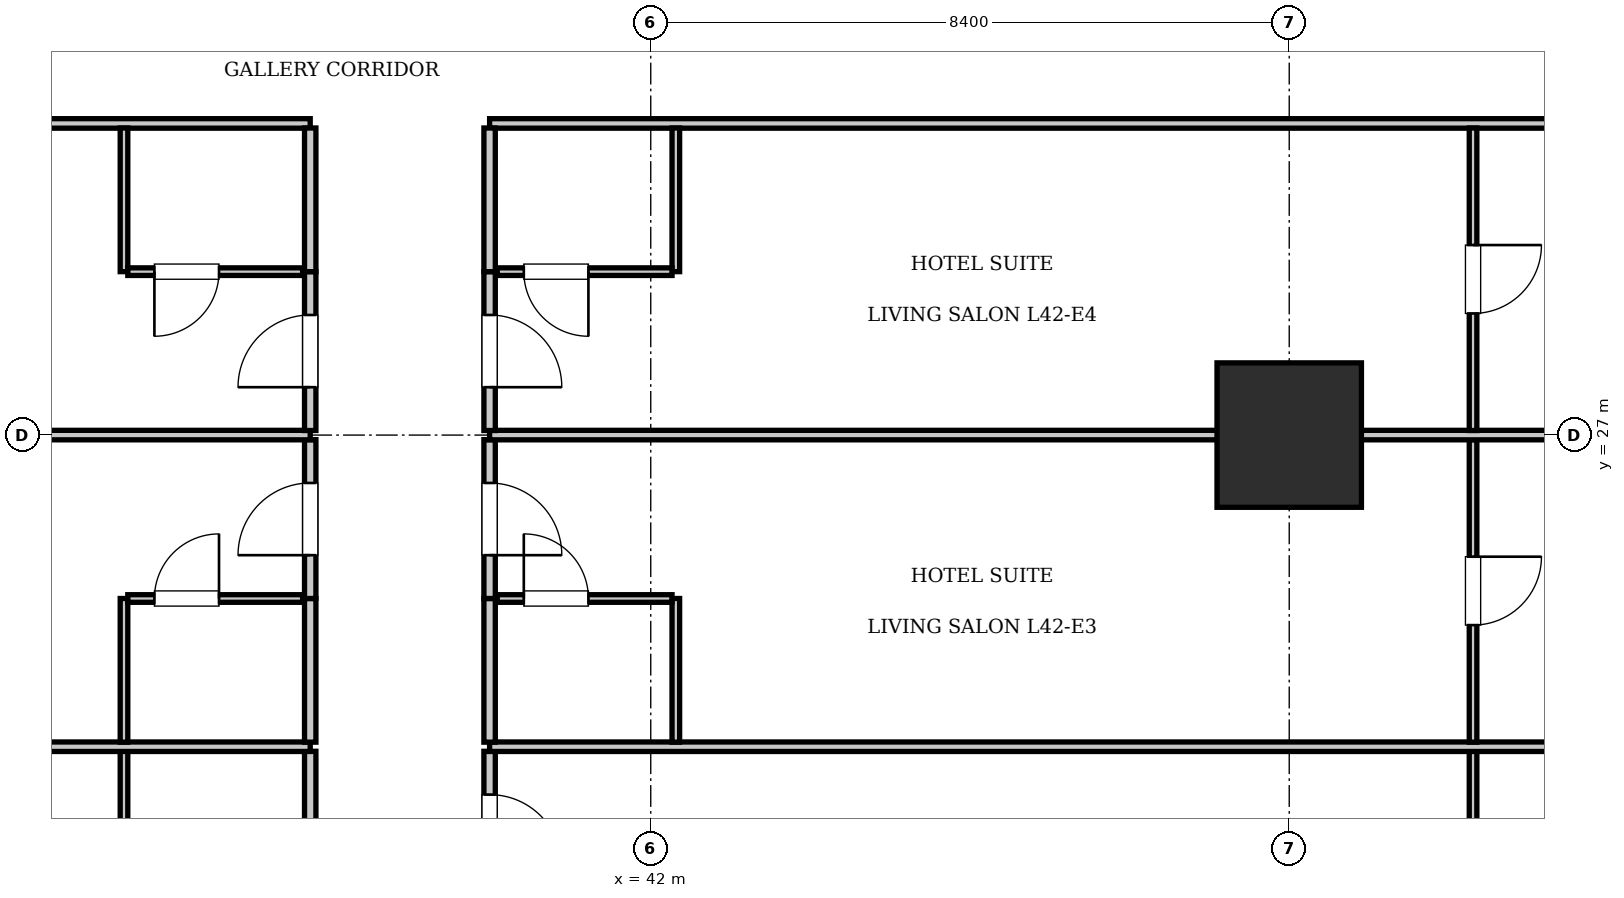
"""IFC4 building model, lengths in metres.
Left out: names, types, materials, properties, quantities, classifications, styles, units other than length and angle.
Written with IfcOpenShell. Run it as: python <this file> out.ifc"""

import sys

from ifc_helpers import new_model, si_unit, direction, frame, frame_2d, origin, origin_2d, place, context, subcontext, project, spatial, rectangle, extrude, element, fill, save


model = new_model("IFC4")
c1 = context("Model", 3, precision=1e-05, world=origin(), true_north=direction((0.0, 1.0)))
c2 = subcontext(c1, "Body", "Model", "MODEL_VIEW")
j1 = project(units=[si_unit("LENGTHUNIT", "METRE"), si_unit("PLANEANGLEUNIT", "RADIAN")], contexts=[c1])
p1 = place(None, origin())
s1 = spatial("IfcSite", under=j1, at=p1, CompositionType="ELEMENT")
p2 = place(p1, origin())
s2 = spatial("IfcBuilding", under=s1, at=p2, CompositionType="ELEMENT")
p3 = place(p2, frame((0.0, 0.0, 173.6)))
s3 = spatial("IfcBuildingStorey", under=s2, at=p3, CompositionType="ELEMENT", Elevation=173.6)
p4 = place(p3, frame((50.4, 27.0, 0.0), z_axis=(0.0, 0.0, 1.0), x_axis=(1.0, 0.0, 0.0)))
e1 = element("IfcColumn", 1, at=p4, inside=s3, PredefinedType="COLUMN", context=c2, shape_type="SweptSolid", body=[
    extrude(rectangle(XDim=1.9, YDim=1.9, at=origin_2d()), origin(), (0.0, 0.0, 1.0), 3.85),
])
p5 = place(p3, frame((13.2, 31.1, 0.0), z_axis=(0.0, 0.0, 1.0), x_axis=(1.0, 0.0, 0.0)))
e2 = element("IfcWall", 2, at=p5, inside=s3, PredefinedType="PARTITIONING", context=c2, shape_type="SweptSolid", body=[
    extrude(rectangle(XDim=24.32, YDim=0.125, at=frame_2d((12.16, 0.0))), origin(), (0.0, 0.0, 1.0), 3.61),
])
p6 = place(p3, frame((39.88, 31.1, 0.0), z_axis=(0.0, 0.0, 1.0), x_axis=(1.0, 0.0, 0.0)))
e3 = element("IfcWall", 3, at=p6, inside=s3, PredefinedType="PARTITIONING", context=c2, shape_type="SweptSolid", body=[
    extrude(rectangle(XDim=22.52, YDim=0.125, at=frame_2d((11.26, 0.0))), origin(), (0.0, 0.0, 1.0), 3.61),
])
p7 = place(p3, frame((37.52, 20.95, 0.0), z_axis=(0.0, 0.0, 1.0), x_axis=(0.0, 1.0, 0.0)))
e4 = element("IfcWall", 4, at=p7, inside=s3, PredefinedType="PARTITIONING", context=c2, shape_type="SweptSolid", body=[
    extrude(rectangle(XDim=1.89, YDim=0.15, at=frame_2d((0.945, 0.0))), origin(), (0.0, 0.0, 1.0), 3.61),
])
p8 = place(p3, frame((35.07, 20.95, 0.0), z_axis=(0.0, 0.0, 1.0), x_axis=(0.0, 1.0, 0.0)))
e5 = element("IfcWall", 5, at=p8, inside=s3, PredefinedType="PARTITIONING", context=c2, shape_type="SweptSolid", body=[
    extrude(rectangle(XDim=1.89, YDim=0.1, at=frame_2d((0.945, 0.0))), origin(), (0.0, 0.0, 1.0), 3.61),
])
p9 = place(p3, frame((39.88, 20.75, 0.0), z_axis=(0.0, 0.0, 1.0), x_axis=(0.0, 1.0, 0.0)))
e6 = element("IfcWall", 6, at=p9, inside=s3, PredefinedType="PARTITIONING", context=c2, shape_type="SweptSolid", body=[
    extrude(rectangle(XDim=2.09, YDim=0.15, at=frame_2d((1.045, 0.0))), origin(), (0.0, 0.0, 1.0), 3.61),
])
p10 = place(p9, frame((0.57, 0.0, 0.0)))
e7 = element("IfcOpeningElement", 7, at=p10, cuts=e6, PredefinedType="OPENING", context=c2, shape_type="SweptSolid", body=[
    extrude(rectangle(XDim=0.95, YDim=2.15, at=frame_2d((0.475, 1.075))), frame((0.0, 0.085, 0.0), z_axis=(0.0, -1.0, 0.0), x_axis=(1.0, 0.0, 0.0)), (0.0, 0.0, 1.0), 0.17),
])
p11 = place(p3, frame((52.818, 18.86, 0.0), z_axis=(0.0, 0.0, 1.0), x_axis=(0.0, 1.0, 0.0)))
e8 = element("IfcWall", 8, at=p11, inside=s3, PredefinedType="PARTITIONING", context=c2, shape_type="SweptSolid", body=[
    extrude(rectangle(XDim=3.98, YDim=0.1, at=frame_2d((1.99, 0.0))), origin(), (0.0, 0.0, 1.0), 3.61),
])
p12 = place(p11, frame((1.54, 0.0, 0.0)))
e9 = element("IfcOpeningElement", 9, at=p12, cuts=e8, PredefinedType="OPENING", context=c2, shape_type="SweptSolid", body=[
    extrude(rectangle(XDim=0.9, YDim=2.1, at=frame_2d((0.45, 1.05))), frame((0.0, 0.06, 0.0), z_axis=(0.0, -1.0, 0.0), x_axis=(1.0, 0.0, 0.0)), (0.0, 0.0, 1.0), 0.12),
])
p13 = place(p3, frame((13.2, 22.9, 0.0), z_axis=(0.0, 0.0, 1.0), x_axis=(1.0, 0.0, 0.0)))
e10 = element("IfcWall", 10, at=p13, inside=s3, PredefinedType="PARTITIONING", context=c2, shape_type="SweptSolid", body=[
    extrude(rectangle(XDim=24.32, YDim=0.125, at=frame_2d((12.16, 0.0))), origin(), (0.0, 0.0, 1.0), 3.61),
])
p14 = place(p3, frame((39.88, 22.9, 0.0), z_axis=(0.0, 0.0, 1.0), x_axis=(1.0, 0.0, 0.0)))
e11 = element("IfcWall", 11, at=p14, inside=s3, PredefinedType="PARTITIONING", context=c2, shape_type="SweptSolid", body=[
    extrude(rectangle(XDim=22.52, YDim=0.125, at=frame_2d((11.26, 0.0))), origin(), (0.0, 0.0, 1.0), 3.61),
])
p15 = place(p3, frame((37.52, 22.96, 0.0), z_axis=(0.0, 0.0, 1.0), x_axis=(0.0, 1.0, 0.0)))
e12 = element("IfcWall", 12, at=p15, inside=s3, PredefinedType="PARTITIONING", context=c2, shape_type="SweptSolid", body=[
    extrude(rectangle(XDim=1.89, YDim=0.15, at=frame_2d((0.945, 0.0))), origin(), (0.0, 0.0, 1.0), 3.61),
])
p16 = place(p3, frame((37.52, 24.85, 0.0), z_axis=(0.0, 0.0, 1.0), x_axis=(0.0, 1.0, 0.0)))
e13 = element("IfcWall", 13, at=p16, inside=s3, PredefinedType="PARTITIONING", context=c2, shape_type="SweptSolid", body=[
    extrude(rectangle(XDim=2.09, YDim=0.15, at=frame_2d((1.045, 0.0))), origin(), (0.0, 0.0, 1.0), 3.61),
])
p17 = place(p16, frame((0.57, 0.0, 0.0)))
e14 = element("IfcOpeningElement", 14, at=p17, cuts=e13, PredefinedType="OPENING", context=c2, shape_type="SweptSolid", body=[
    extrude(rectangle(XDim=0.95, YDim=2.15, at=frame_2d((0.475, 1.075))), frame((0.0, 0.085, 0.0), z_axis=(0.0, -1.0, 0.0), x_axis=(1.0, 0.0, 0.0)), (0.0, 0.0, 1.0), 0.17),
])
p18 = place(p3, frame((35.07, 22.96, 0.0), z_axis=(0.0, 0.0, 1.0), x_axis=(0.0, 1.0, 0.0)))
e15 = element("IfcWall", 15, at=p18, inside=s3, PredefinedType="PARTITIONING", context=c2, shape_type="SweptSolid", body=[
    extrude(rectangle(XDim=1.89, YDim=0.1, at=frame_2d((0.945, 0.0))), origin(), (0.0, 0.0, 1.0), 3.61),
])
p19 = place(p3, frame((35.12, 24.85, 0.0), z_axis=(0.0, 0.0, 1.0), x_axis=(1.0, 0.0, 0.0)))
e16 = element("IfcWall", 16, at=p19, inside=s3, PredefinedType="PARTITIONING", context=c2, shape_type="SweptSolid", body=[
    extrude(rectangle(XDim=2.3, YDim=0.1, at=frame_2d((1.15, 0.0))), origin(), (0.0, 0.0, 1.0), 3.61),
])
p20 = place(p19, frame((0.35, 0.0, 0.0)))
e17 = element("IfcOpeningElement", 17, at=p20, cuts=e16, PredefinedType="OPENING", context=c2, shape_type="SweptSolid", body=[
    extrude(rectangle(XDim=0.85, YDim=2.1, at=frame_2d((0.425, 1.05))), frame((0.0, 0.06, 0.0), z_axis=(0.0, -1.0, 0.0), x_axis=(1.0, 0.0, 0.0)), (0.0, 0.0, 1.0), 0.12),
])
p21 = place(p3, frame((39.88, 22.96, 0.0), z_axis=(0.0, 0.0, 1.0), x_axis=(0.0, 1.0, 0.0)))
e18 = element("IfcWall", 18, at=p21, inside=s3, PredefinedType="PARTITIONING", context=c2, shape_type="SweptSolid", body=[
    extrude(rectangle(XDim=1.89, YDim=0.15, at=frame_2d((0.945, 0.0))), origin(), (0.0, 0.0, 1.0), 3.61),
])
p22 = place(p3, frame((39.88, 24.85, 0.0), z_axis=(0.0, 0.0, 1.0), x_axis=(0.0, 1.0, 0.0)))
e19 = element("IfcWall", 19, at=p22, inside=s3, PredefinedType="PARTITIONING", context=c2, shape_type="SweptSolid", body=[
    extrude(rectangle(XDim=2.09, YDim=0.15, at=frame_2d((1.045, 0.0))), origin(), (0.0, 0.0, 1.0), 3.61),
])
p23 = place(p22, frame((0.57, 0.0, 0.0)))
e20 = element("IfcOpeningElement", 20, at=p23, cuts=e19, PredefinedType="OPENING", context=c2, shape_type="SweptSolid", body=[
    extrude(rectangle(XDim=0.95, YDim=2.15, at=frame_2d((0.475, 1.075))), frame((0.0, 0.085, 0.0), z_axis=(0.0, -1.0, 0.0), x_axis=(1.0, 0.0, 0.0)), (0.0, 0.0, 1.0), 0.17),
])
p24 = place(p3, frame((42.33, 22.96, 0.0), z_axis=(0.0, 0.0, 1.0), x_axis=(0.0, 1.0, 0.0)))
e21 = element("IfcWall", 21, at=p24, inside=s3, PredefinedType="PARTITIONING", context=c2, shape_type="SweptSolid", body=[
    extrude(rectangle(XDim=1.89, YDim=0.1, at=frame_2d((0.945, 0.0))), origin(), (0.0, 0.0, 1.0), 3.61),
])
p25 = place(p3, frame((39.98, 24.85, 0.0), z_axis=(0.0, 0.0, 1.0), x_axis=(1.0, 0.0, 0.0)))
e22 = element("IfcWall", 22, at=p25, inside=s3, PredefinedType="PARTITIONING", context=c2, shape_type="SweptSolid", body=[
    extrude(rectangle(XDim=2.3, YDim=0.1, at=frame_2d((1.15, 0.0))), origin(), (0.0, 0.0, 1.0), 3.61),
])
p26 = place(p25, frame((0.35, 0.0, 0.0)))
e23 = element("IfcOpeningElement", 23, at=p26, cuts=e22, PredefinedType="OPENING", context=c2, shape_type="SweptSolid", body=[
    extrude(rectangle(XDim=0.85, YDim=2.1, at=frame_2d((0.425, 1.05))), frame((0.0, 0.06, 0.0), z_axis=(0.0, -1.0, 0.0), x_axis=(1.0, 0.0, 0.0)), (0.0, 0.0, 1.0), 0.12),
])
p27 = place(p3, frame((52.818, 22.96, 0.0), z_axis=(0.0, 0.0, 1.0), x_axis=(0.0, 1.0, 0.0)))
e24 = element("IfcWall", 24, at=p27, inside=s3, PredefinedType="PARTITIONING", context=c2, shape_type="SweptSolid", body=[
    extrude(rectangle(XDim=3.98, YDim=0.1, at=frame_2d((1.99, 0.0))), origin(), (0.0, 0.0, 1.0), 3.61),
])
p28 = place(p27, frame((1.54, 0.0, 0.0)))
e25 = element("IfcOpeningElement", 25, at=p28, cuts=e24, PredefinedType="OPENING", context=c2, shape_type="SweptSolid", body=[
    extrude(rectangle(XDim=0.9, YDim=2.1, at=frame_2d((0.45, 1.05))), frame((0.0, 0.06, 0.0), z_axis=(0.0, -1.0, 0.0), x_axis=(1.0, 0.0, 0.0)), (0.0, 0.0, 1.0), 0.12),
])
p29 = place(p3, frame((13.2, 27.0, 0.0), z_axis=(0.0, 0.0, 1.0), x_axis=(1.0, 0.0, 0.0)))
e26 = element("IfcWall", 26, at=p29, inside=s3, PredefinedType="PARTITIONING", context=c2, shape_type="SweptSolid", body=[
    extrude(rectangle(XDim=24.32, YDim=0.125, at=frame_2d((12.16, 0.0))), origin(), (0.0, 0.0, 1.0), 2.41),
])
p30 = place(p3, frame((39.88, 27.0, 0.0), z_axis=(0.0, 0.0, 1.0), x_axis=(1.0, 0.0, 0.0)))
e27 = element("IfcWall", 27, at=p30, inside=s3, PredefinedType="PARTITIONING", context=c2, shape_type="SweptSolid", body=[
    extrude(rectangle(XDim=22.52, YDim=0.125, at=frame_2d((11.26, 0.0))), origin(), (0.0, 0.0, 1.0), 2.41),
])
p31 = place(p3, frame((37.52, 27.06, 0.0), z_axis=(0.0, 0.0, 1.0), x_axis=(0.0, 1.0, 0.0)))
e28 = element("IfcWall", 28, at=p31, inside=s3, PredefinedType="PARTITIONING", context=c2, shape_type="SweptSolid", body=[
    extrude(rectangle(XDim=2.09, YDim=0.15, at=frame_2d((1.045, 0.0))), origin(), (0.0, 0.0, 1.0), 3.61),
])
p32 = place(p31, frame((0.57, 0.0, 0.0)))
e29 = element("IfcOpeningElement", 29, at=p32, cuts=e28, PredefinedType="OPENING", context=c2, shape_type="SweptSolid", body=[
    extrude(rectangle(XDim=0.95, YDim=2.15, at=frame_2d((0.475, 1.075))), frame((0.0, 0.085, 0.0), z_axis=(0.0, -1.0, 0.0), x_axis=(1.0, 0.0, 0.0)), (0.0, 0.0, 1.0), 0.17),
])
p33 = place(p3, frame((37.52, 29.15, 0.0), z_axis=(0.0, 0.0, 1.0), x_axis=(0.0, 1.0, 0.0)))
e30 = element("IfcWall", 30, at=p33, inside=s3, PredefinedType="PARTITIONING", context=c2, shape_type="SweptSolid", body=[
    extrude(rectangle(XDim=1.89, YDim=0.15, at=frame_2d((0.945, 0.0))), origin(), (0.0, 0.0, 1.0), 3.61),
])
p34 = place(p3, frame((35.07, 29.15, 0.0), z_axis=(0.0, 0.0, 1.0), x_axis=(0.0, 1.0, 0.0)))
e31 = element("IfcWall", 31, at=p34, inside=s3, PredefinedType="PARTITIONING", context=c2, shape_type="SweptSolid", body=[
    extrude(rectangle(XDim=1.89, YDim=0.1, at=frame_2d((0.945, 0.0))), origin(), (0.0, 0.0, 1.0), 3.61),
])
p35 = place(p3, frame((35.12, 29.15, 0.0), z_axis=(0.0, 0.0, 1.0), x_axis=(1.0, 0.0, 0.0)))
e32 = element("IfcWall", 32, at=p35, inside=s3, PredefinedType="PARTITIONING", context=c2, shape_type="SweptSolid", body=[
    extrude(rectangle(XDim=2.3, YDim=0.1, at=frame_2d((1.15, 0.0))), origin(), (0.0, 0.0, 1.0), 3.61),
])
p36 = place(p35, frame((0.35, 0.0, 0.0)))
e33 = element("IfcOpeningElement", 33, at=p36, cuts=e32, PredefinedType="OPENING", context=c2, shape_type="SweptSolid", body=[
    extrude(rectangle(XDim=0.85, YDim=2.1, at=frame_2d((0.425, 1.05))), frame((0.0, 0.06, 0.0), z_axis=(0.0, -1.0, 0.0), x_axis=(1.0, 0.0, 0.0)), (0.0, 0.0, 1.0), 0.12),
])
p37 = place(p3, frame((39.88, 27.06, 0.0), z_axis=(0.0, 0.0, 1.0), x_axis=(0.0, 1.0, 0.0)))
e34 = element("IfcWall", 34, at=p37, inside=s3, PredefinedType="PARTITIONING", context=c2, shape_type="SweptSolid", body=[
    extrude(rectangle(XDim=2.09, YDim=0.15, at=frame_2d((1.045, 0.0))), origin(), (0.0, 0.0, 1.0), 3.61),
])
p38 = place(p37, frame((0.57, 0.0, 0.0)))
e35 = element("IfcOpeningElement", 35, at=p38, cuts=e34, PredefinedType="OPENING", context=c2, shape_type="SweptSolid", body=[
    extrude(rectangle(XDim=0.95, YDim=2.15, at=frame_2d((0.475, 1.075))), frame((0.0, 0.085, 0.0), z_axis=(0.0, -1.0, 0.0), x_axis=(1.0, 0.0, 0.0)), (0.0, 0.0, 1.0), 0.17),
])
p39 = place(p3, frame((39.88, 29.15, 0.0), z_axis=(0.0, 0.0, 1.0), x_axis=(0.0, 1.0, 0.0)))
e36 = element("IfcWall", 36, at=p39, inside=s3, PredefinedType="PARTITIONING", context=c2, shape_type="SweptSolid", body=[
    extrude(rectangle(XDim=1.89, YDim=0.15, at=frame_2d((0.945, 0.0))), origin(), (0.0, 0.0, 1.0), 3.61),
])
p40 = place(p3, frame((42.33, 29.15, 0.0), z_axis=(0.0, 0.0, 1.0), x_axis=(0.0, 1.0, 0.0)))
e37 = element("IfcWall", 37, at=p40, inside=s3, PredefinedType="PARTITIONING", context=c2, shape_type="SweptSolid", body=[
    extrude(rectangle(XDim=1.89, YDim=0.1, at=frame_2d((0.945, 0.0))), origin(), (0.0, 0.0, 1.0), 3.61),
])
p41 = place(p3, frame((39.98, 29.15, 0.0), z_axis=(0.0, 0.0, 1.0), x_axis=(1.0, 0.0, 0.0)))
e38 = element("IfcWall", 38, at=p41, inside=s3, PredefinedType="PARTITIONING", context=c2, shape_type="SweptSolid", body=[
    extrude(rectangle(XDim=2.3, YDim=0.1, at=frame_2d((1.15, 0.0))), origin(), (0.0, 0.0, 1.0), 3.61),
])
p42 = place(p41, frame((0.35, 0.0, 0.0)))
e39 = element("IfcOpeningElement", 39, at=p42, cuts=e38, PredefinedType="OPENING", context=c2, shape_type="SweptSolid", body=[
    extrude(rectangle(XDim=0.85, YDim=2.1, at=frame_2d((0.425, 1.05))), frame((0.0, 0.06, 0.0), z_axis=(0.0, -1.0, 0.0), x_axis=(1.0, 0.0, 0.0)), (0.0, 0.0, 1.0), 0.12),
])
p43 = place(p3, frame((52.818, 27.06, 0.0), z_axis=(0.0, 0.0, 1.0), x_axis=(0.0, 1.0, 0.0)))
e40 = element("IfcWall", 40, at=p43, inside=s3, PredefinedType="PARTITIONING", context=c2, shape_type="SweptSolid", body=[
    extrude(rectangle(XDim=3.98, YDim=0.1, at=frame_2d((1.99, 0.0))), origin(), (0.0, 0.0, 1.0), 3.61),
])
p44 = place(p43, frame((1.54, 0.0, 0.0)))
e41 = element("IfcOpeningElement", 41, at=p44, cuts=e40, PredefinedType="OPENING", context=c2, shape_type="SweptSolid", body=[
    extrude(rectangle(XDim=0.9, YDim=2.1, at=frame_2d((0.45, 1.05))), frame((0.0, 0.06, 0.0), z_axis=(0.0, -1.0, 0.0), x_axis=(1.0, 0.0, 0.0)), (0.0, 0.0, 1.0), 0.12),
])
p45 = place(p10, frame((0.95, 0.0, 0.0), z_axis=(0.0, 0.0, 1.0), x_axis=(-1.0, 0.0, 0.0)))
e42 = element("IfcDoor", 42, at=p45, inside=s3, OperationType="SINGLE_SWING_RIGHT", PredefinedType="DOOR", context=c2, shape_type="SweptSolid", body=[
    extrude(rectangle(XDim=0.95, YDim=2.15, at=frame_2d((0.475, 1.075))), frame((0.0, 0.025, 0.0), z_axis=(0.0, -1.0, 0.0), x_axis=(1.0, 0.0, 0.0)), (0.0, 0.0, 1.0), 0.05),
])
fill(e7, e42)
p46 = place(p20, origin())
e43 = element("IfcDoor", 43, at=p46, inside=s3, OperationType="SINGLE_SWING_RIGHT", PredefinedType="DOOR", context=c2, shape_type="SweptSolid", body=[
    extrude(rectangle(XDim=0.85, YDim=2.1, at=frame_2d((0.425, 1.05))), frame((0.0, 0.025, 0.0), z_axis=(0.0, -1.0, 0.0), x_axis=(1.0, 0.0, 0.0)), (0.0, 0.0, 1.0), 0.05),
])
fill(e17, e43)
p47 = place(p17, origin())
e44 = element("IfcDoor", 44, at=p47, inside=s3, OperationType="SINGLE_SWING_LEFT", PredefinedType="DOOR", context=c2, shape_type="SweptSolid", body=[
    extrude(rectangle(XDim=0.95, YDim=2.15, at=frame_2d((0.475, 1.075))), frame((0.0, 0.025, 0.0), z_axis=(0.0, -1.0, 0.0), x_axis=(1.0, 0.0, 0.0)), (0.0, 0.0, 1.0), 0.05),
])
fill(e14, e44)
p48 = place(p26, origin())
e45 = element("IfcDoor", 45, at=p48, inside=s3, OperationType="SINGLE_SWING_LEFT", PredefinedType="DOOR", context=c2, shape_type="SweptSolid", body=[
    extrude(rectangle(XDim=0.85, YDim=2.1, at=frame_2d((0.425, 1.05))), frame((0.0, 0.025, 0.0), z_axis=(0.0, -1.0, 0.0), x_axis=(1.0, 0.0, 0.0)), (0.0, 0.0, 1.0), 0.05),
])
fill(e23, e45)
p49 = place(p23, frame((0.95, 0.0, 0.0), z_axis=(0.0, 0.0, 1.0), x_axis=(-1.0, 0.0, 0.0)))
e46 = element("IfcDoor", 46, at=p49, inside=s3, OperationType="SINGLE_SWING_RIGHT", PredefinedType="DOOR", context=c2, shape_type="SweptSolid", body=[
    extrude(rectangle(XDim=0.95, YDim=2.15, at=frame_2d((0.475, 1.075))), frame((0.0, 0.025, 0.0), z_axis=(0.0, -1.0, 0.0), x_axis=(1.0, 0.0, 0.0)), (0.0, 0.0, 1.0), 0.05),
])
fill(e20, e46)
p50 = place(p28, frame((0.9, 0.0, 0.0), z_axis=(0.0, 0.0, 1.0), x_axis=(-1.0, 0.0, 0.0)))
e47 = element("IfcDoor", 47, at=p50, inside=s3, OperationType="SINGLE_SWING_LEFT", PredefinedType="DOOR", context=c2, shape_type="SweptSolid", body=[
    extrude(rectangle(XDim=0.9, YDim=2.1, at=frame_2d((0.45, 1.05))), frame((0.0, 0.025, 0.0), z_axis=(0.0, -1.0, 0.0), x_axis=(1.0, 0.0, 0.0)), (0.0, 0.0, 1.0), 0.05),
])
fill(e25, e47)
p51 = place(p36, frame((0.85, 0.0, 0.0), z_axis=(0.0, 0.0, 1.0), x_axis=(-1.0, 0.0, 0.0)))
e48 = element("IfcDoor", 48, at=p51, inside=s3, OperationType="SINGLE_SWING_RIGHT", PredefinedType="DOOR", context=c2, shape_type="SweptSolid", body=[
    extrude(rectangle(XDim=0.85, YDim=2.1, at=frame_2d((0.425, 1.05))), frame((0.0, 0.025, 0.0), z_axis=(0.0, -1.0, 0.0), x_axis=(1.0, 0.0, 0.0)), (0.0, 0.0, 1.0), 0.05),
])
fill(e33, e48)
p52 = place(p32, origin())
e49 = element("IfcDoor", 49, at=p52, inside=s3, OperationType="SINGLE_SWING_LEFT", PredefinedType="DOOR", context=c2, shape_type="SweptSolid", body=[
    extrude(rectangle(XDim=0.95, YDim=2.15, at=frame_2d((0.475, 1.075))), frame((0.0, 0.025, 0.0), z_axis=(0.0, -1.0, 0.0), x_axis=(1.0, 0.0, 0.0)), (0.0, 0.0, 1.0), 0.05),
])
fill(e29, e49)
p53 = place(p42, frame((0.85, 0.0, 0.0), z_axis=(0.0, 0.0, 1.0), x_axis=(-1.0, 0.0, 0.0)))
e50 = element("IfcDoor", 50, at=p53, inside=s3, OperationType="SINGLE_SWING_LEFT", PredefinedType="DOOR", context=c2, shape_type="SweptSolid", body=[
    extrude(rectangle(XDim=0.85, YDim=2.1, at=frame_2d((0.425, 1.05))), frame((0.0, 0.025, 0.0), z_axis=(0.0, -1.0, 0.0), x_axis=(1.0, 0.0, 0.0)), (0.0, 0.0, 1.0), 0.05),
])
fill(e39, e50)
p54 = place(p38, frame((0.95, 0.0, 0.0), z_axis=(0.0, 0.0, 1.0), x_axis=(-1.0, 0.0, 0.0)))
e51 = element("IfcDoor", 51, at=p54, inside=s3, OperationType="SINGLE_SWING_RIGHT", PredefinedType="DOOR", context=c2, shape_type="SweptSolid", body=[
    extrude(rectangle(XDim=0.95, YDim=2.15, at=frame_2d((0.475, 1.075))), frame((0.0, 0.025, 0.0), z_axis=(0.0, -1.0, 0.0), x_axis=(1.0, 0.0, 0.0)), (0.0, 0.0, 1.0), 0.05),
])
fill(e35, e51)
p55 = place(p44, frame((0.9, 0.0, 0.0), z_axis=(0.0, 0.0, 1.0), x_axis=(-1.0, 0.0, 0.0)))
e52 = element("IfcDoor", 52, at=p55, inside=s3, OperationType="SINGLE_SWING_LEFT", PredefinedType="DOOR", context=c2, shape_type="SweptSolid", body=[
    extrude(rectangle(XDim=0.9, YDim=2.1, at=frame_2d((0.45, 1.05))), frame((0.0, 0.025, 0.0), z_axis=(0.0, -1.0, 0.0), x_axis=(1.0, 0.0, 0.0)), (0.0, 0.0, 1.0), 0.05),
])
fill(e41, e52)
save(model, sys.argv[1])
